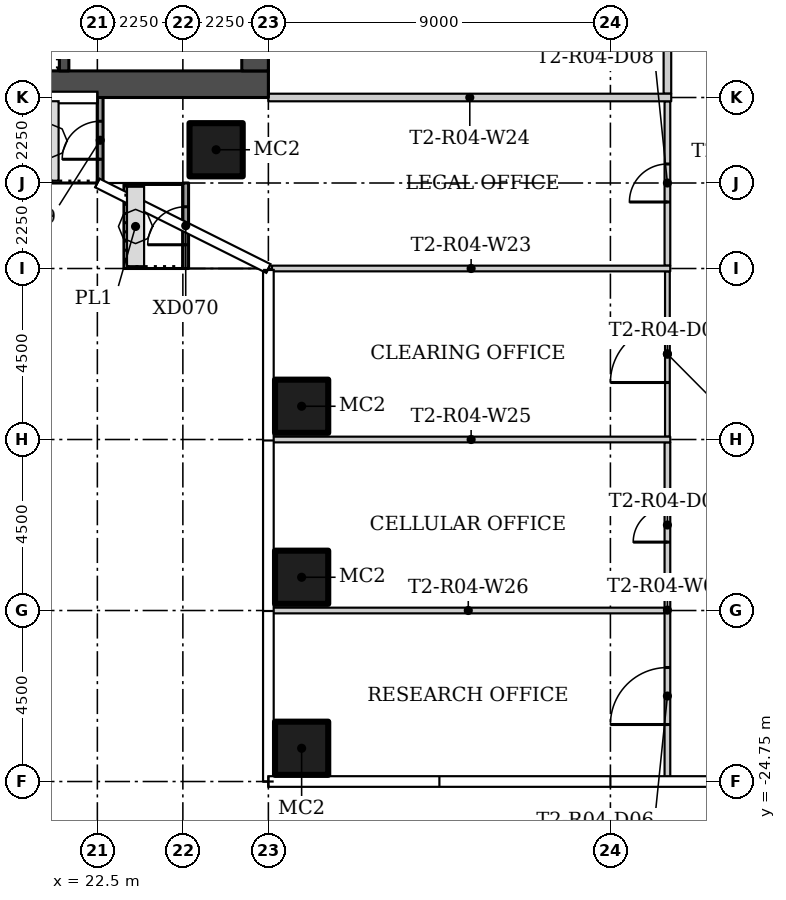
"""IFC4 building model, lengths in metres.
Left out: names, types, materials, properties, quantities, classifications, styles, units other than length and angle.
Written with IfcOpenShell. Run it as: python <this file> out.ifc"""

import sys

from ifc_helpers import new_model, si_unit, direction, frame, frame_2d, origin, origin_2d, place, context, subcontext, project, spatial, rectangle, hollow_rectangle, extrude, element, fill, save


model = new_model("IFC4")
c1 = context("Model", 3, precision=1e-05, world=origin(), true_north=direction((0.0, 1.0)))
c2 = subcontext(c1, "Body", "Model", "MODEL_VIEW")
j1 = project(units=[si_unit("LENGTHUNIT", "METRE"), si_unit("PLANEANGLEUNIT", "RADIAN")], contexts=[c1])
p1 = place(None, origin())
s1 = spatial("IfcSite", under=j1, at=p1, CompositionType="ELEMENT")
p2 = place(p1, origin())
s2 = spatial("IfcBuilding", under=s1, at=p2, CompositionType="ELEMENT")
p3 = place(p2, frame((0.0, 0.0, 53.7)))
s3 = spatial("IfcBuildingStorey", under=s2, at=p3, CompositionType="ELEMENT", Elevation=53.7)
for number, where in (
    (1, (25.625, -8.125, 0.0)),
    (2, (27.875, -14.875, 0.0)),
    (3, (27.875, -19.375, 0.0)),
    (4, (27.875, -23.875, 0.0)),
):
    element("IfcColumn", number, at=place(p3, frame(where)), inside=s3, PredefinedType="COLUMN", context=c2, shape_type="SweptSolid", body=[
        extrude(hollow_rectangle(XDim=1.4, YDim=1.4, WallThickness=0.05, at=origin_2d()), origin(), (0.0, 0.0, 1.0), 3.55),
    ])
p4 = place(p3, frame((37.5, -11.175, 0.0), z_axis=(0.0, 0.0, 1.0), x_axis=(0.0, 1.0, 0.0)))
e5 = element("IfcWall", 5, at=p4, inside=s3, PredefinedType="PARTITIONING", context=c2, shape_type="SweptSolid", body=[
    extrude(rectangle(XDim=4.325, YDim=0.15, at=frame_2d((2.163, 0.0))), origin(), (0.0, 0.0, 1.0), 3.55),
])
p5 = place(p4, frame((1.675, 0.0, 0.0)))
e6 = element("IfcOpeningElement", 6, at=p5, cuts=e5, PredefinedType="OPENING", context=c2, shape_type="SweptSolid", body=[
    extrude(rectangle(XDim=1.0, YDim=2.4, at=frame_2d((0.5, 1.2))), frame((0.0, 0.085, 0.0), z_axis=(0.0, -1.0, 0.0), x_axis=(1.0, 0.0, 0.0)), (0.0, 0.0, 1.0), 0.17),
])
p6 = place(p3, frame((37.5, -24.655, 0.0), z_axis=(0.0, 0.0, 1.0), x_axis=(0.0, 1.0, 0.0)))
e7 = element("IfcWall", 7, at=p6, inside=s3, PredefinedType="PARTITIONING", context=c2, shape_type="SweptSolid", body=[
    extrude(rectangle(XDim=8.83, YDim=0.15, at=frame_2d((4.415, 0.0))), origin(), (0.0, 0.0, 1.0), 3.55),
])
p7 = place(p6, frame((6.205, 0.0, 0.0)))
e8 = element("IfcOpeningElement", 8, at=p7, cuts=e7, PredefinedType="OPENING", context=c2, shape_type="SweptSolid", body=[
    extrude(rectangle(XDim=0.9, YDim=2.1, at=frame_2d((0.45, 1.05))), frame((0.0, 0.085, 0.0), z_axis=(0.0, -1.0, 0.0), x_axis=(1.0, 0.0, 0.0)), (0.0, 0.0, 1.0), 0.17),
])
p8 = place(p6, frame((1.405, 0.0, 0.0)))
e9 = element("IfcOpeningElement", 9, at=p8, cuts=e7, PredefinedType="OPENING", context=c2, shape_type="SweptSolid", body=[
    extrude(rectangle(XDim=1.5, YDim=2.1, at=frame_2d((0.75, 1.05))), frame((0.0, 0.085, 0.0), z_axis=(0.0, -1.0, 0.0), x_axis=(1.0, 0.0, 0.0)), (0.0, 0.0, 1.0), 0.17),
])
p9 = place(p3, frame((37.5, -15.675, 0.0), z_axis=(0.0, 0.0, 1.0), x_axis=(0.0, 1.0, 0.0)))
e10 = element("IfcWall", 10, at=p9, inside=s3, PredefinedType="PARTITIONING", context=c2, shape_type="SweptSolid", body=[
    extrude(rectangle(XDim=4.35, YDim=0.125, at=frame_2d((2.175, 0.0))), origin(), (0.0, 0.0, 1.0), 3.55),
])
p10 = place(p9, frame((1.425, 0.0, 0.0)))
e11 = element("IfcOpeningElement", 11, at=p10, cuts=e10, PredefinedType="OPENING", context=c2, shape_type="SweptSolid", body=[
    extrude(rectangle(XDim=1.5, YDim=2.1, at=frame_2d((0.75, 1.05))), frame((0.0, 0.073, 0.0), z_axis=(0.0, -1.0, 0.0), x_axis=(1.0, 0.0, 0.0)), (0.0, 0.0, 1.0), 0.145),
])
p11 = place(p3, frame((37.5, -6.65, 0.0), z_axis=(0.0, 0.0, 1.0), x_axis=(0.0, 1.0, 0.0)))
e12 = element("IfcWall", 12, at=p11, inside=s3, PredefinedType="PARTITIONING", context=c2, shape_type="SweptSolid", body=[
    extrude(rectangle(XDim=6.6, YDim=0.2, at=frame_2d((3.3, 0.0))), origin(), (0.0, 0.0, 1.0), 3.55),
])
p12 = place(p3, frame((27.095, -11.25, 0.0)))
e13 = element("IfcWall", 13, at=p12, inside=s3, PredefinedType="PARTITIONING", context=c2, shape_type="SweptSolid", body=[
    extrude(rectangle(XDim=10.48, YDim=0.15, at=frame_2d((5.24, 0.0))), origin(), (0.0, 0.0, 1.0), 3.55),
])
p13 = place(p3, frame((37.6, -6.75, 0.0), z_axis=(0.0, 0.0, 1.0), x_axis=(-1.0, 0.0, 0.0)))
e14 = element("IfcWall", 14, at=p13, inside=s3, PredefinedType="PARTITIONING", context=c2, shape_type="SweptSolid", body=[
    extrude(rectangle(XDim=10.6, YDim=0.2, at=frame_2d((5.3, 0.0))), origin(), (0.0, 0.0, 1.0), 3.55),
])
p14 = place(p3, frame((27.095, -15.75, 0.0)))
e15 = element("IfcWall", 15, at=p14, inside=s3, PredefinedType="PARTITIONING", context=c2, shape_type="SweptSolid", body=[
    extrude(rectangle(XDim=10.48, YDim=0.15, at=frame_2d((5.24, 0.0))), origin(), (0.0, 0.0, 1.0), 3.55),
])
p15 = place(p3, frame((27.095, -20.25, 0.0)))
e16 = element("IfcWall", 16, at=p15, inside=s3, PredefinedType="PARTITIONING", context=c2, shape_type="SweptSolid", body=[
    extrude(rectangle(XDim=10.33, YDim=0.15, at=frame_2d((5.165, 0.0))), origin(), (0.0, 0.0, 1.0), 3.55),
])
p16 = place(p3, frame((22.575, -9.0, 0.0), z_axis=(0.0, 0.0, 1.0), x_axis=(0.0, 1.0, 0.0)))
e17 = element("IfcWall", 17, at=p16, inside=s3, PredefinedType="SOLIDWALL", context=c2, shape_type="SweptSolid", body=[
    extrude(rectangle(XDim=2.257, YDim=0.15, at=frame_2d((1.128, 0.0))), origin(), (0.0, 0.0, 1.0), 3.45),
])
p17 = place(p16, frame((0.625, 0.0, 0.0)))
e18 = element("IfcOpeningElement", 18, at=p17, cuts=e17, PredefinedType="OPENING", context=c2, shape_type="SweptSolid", body=[
    extrude(rectangle(XDim=1.0, YDim=2.4, at=frame_2d((0.5, 1.2))), frame((0.0, 0.085, 0.0), z_axis=(0.0, -1.0, 0.0), x_axis=(1.0, 0.0, 0.0)), (0.0, 0.0, 1.0), 0.17),
])
p18 = place(p3, frame((24.825, -11.25, 0.0), z_axis=(0.0, 0.0, 1.0), x_axis=(0.0, 1.0, 0.0)))
e19 = element("IfcWall", 19, at=p18, inside=s3, PredefinedType="SOLIDWALL", context=c2, shape_type="SweptSolid", body=[
    extrude(rectangle(XDim=2.25, YDim=0.15, at=frame_2d((1.125, 0.0))), origin(), (0.0, 0.0, 1.0), 3.45),
])
p19 = place(p18, frame((0.625, 0.0, 0.0)))
e20 = element("IfcOpeningElement", 20, at=p19, cuts=e19, PredefinedType="OPENING", context=c2, shape_type="SweptSolid", body=[
    extrude(rectangle(XDim=1.0, YDim=2.4, at=frame_2d((0.5, 1.2))), frame((0.0, 0.085, 0.0), z_axis=(0.0, -1.0, 0.0), x_axis=(1.0, 0.0, 0.0)), (0.0, 0.0, 1.0), 0.17),
])
p20 = place(p3, frame((13.5, -6.4, 0.0)))
e21 = element("IfcWall", 21, at=p20, inside=s3, PredefinedType="SHEAR", context=c2, shape_type="SweptSolid", body=[
    extrude(rectangle(XDim=13.5, YDim=0.7, at=frame_2d((6.75, 0.0))), origin(), (0.0, 0.0, 1.0), 3.55),
])
p21 = place(p3, frame((26.65, 6.05, 0.0), z_axis=(0.0, 0.0, 1.0), x_axis=(0.0, -1.0, 0.0)))
e22 = element("IfcWall", 22, at=p21, inside=s3, PredefinedType="SHEAR", context=c2, shape_type="SweptSolid", body=[
    extrude(rectangle(XDim=12.1, YDim=0.7, at=frame_2d((6.05, 0.0))), origin(), (0.0, 0.0, 1.0), 3.55),
])
p22 = place(p21, frame((10.1, 0.0, 0.0)))
e23 = element("IfcOpeningElement", 23, at=p22, cuts=e22, PredefinedType="OPENING", context=c2, shape_type="SweptSolid", body=[
    extrude(rectangle(XDim=1.2, YDim=2.1, at=frame_2d((0.6, 1.05))), frame((0.0, 0.36, 0.0), z_axis=(0.0, -1.0, 0.0), x_axis=(1.0, 0.0, 0.0)), (0.0, 0.0, 1.0), 0.72),
])
p23 = place(p21, frame((3.9, 0.0, 0.0)))
e24 = element("IfcOpeningElement", 24, at=p23, cuts=e22, PredefinedType="OPENING", context=c2, shape_type="SweptSolid", body=[
    extrude(rectangle(XDim=1.8, YDim=2.4, at=frame_2d((0.9, 1.2))), frame((0.0, 0.36, 0.0), z_axis=(0.0, -1.0, 0.0), x_axis=(1.0, 0.0, 0.0)), (0.0, 0.0, 1.0), 0.72),
])
p24 = place(p3, frame((21.625, -6.05, 0.0), z_axis=(0.0, 0.0, 1.0), x_axis=(0.0, 1.0, 0.0)))
e25 = element("IfcWall", 25, at=p24, inside=s3, PredefinedType="SHEAR", context=c2, shape_type="SweptSolid", body=[
    extrude(rectangle(XDim=2.55, YDim=0.25, at=frame_2d((1.275, 0.0))), origin(), (0.0, 0.0, 1.0), 3.55),
])
p25 = place(p7, origin())
e26 = element("IfcDoor", 26, at=p25, inside=s3, OperationType="SINGLE_SWING_LEFT", PredefinedType="DOOR", context=c2, shape_type="SweptSolid", body=[
    extrude(rectangle(XDim=0.9, YDim=2.1, at=frame_2d((0.45, 1.05))), frame((0.0, 0.025, 0.0), z_axis=(0.0, -1.0, 0.0), x_axis=(1.0, 0.0, 0.0)), (0.0, 0.0, 1.0), 0.05),
])
fill(e8, e26)
p26 = place(p8, origin())
e27 = element("IfcDoor", 27, at=p26, inside=s3, OperationType="DOUBLE_DOOR_SINGLE_SWING", PredefinedType="DOOR", context=c2, shape_type="SweptSolid", body=[
    extrude(rectangle(XDim=1.5, YDim=2.1, at=frame_2d((0.75, 1.05))), frame((0.0, 0.025, 0.0), z_axis=(0.0, -1.0, 0.0), x_axis=(1.0, 0.0, 0.0)), (0.0, 0.0, 1.0), 0.05),
])
fill(e9, e27)
p27 = place(p10, origin())
e28 = element("IfcDoor", 28, at=p27, inside=s3, OperationType="DOUBLE_DOOR_SINGLE_SWING", PredefinedType="DOOR", context=c2, shape_type="SweptSolid", body=[
    extrude(rectangle(XDim=1.5, YDim=2.1, at=frame_2d((0.75, 1.05))), frame((0.0, 0.025, 0.0), z_axis=(0.0, -1.0, 0.0), x_axis=(1.0, 0.0, 0.0)), (0.0, 0.0, 1.0), 0.05),
])
fill(e11, e28)
p28 = place(p5, origin())
e29 = element("IfcDoor", 29, at=p28, inside=s3, OperationType="SINGLE_SWING_RIGHT", PredefinedType="DOOR", context=c2, shape_type="SweptSolid", body=[
    extrude(rectangle(XDim=1.0, YDim=2.4, at=frame_2d((0.5, 1.2))), frame((0.0, 0.025, 0.0), z_axis=(0.0, -1.0, 0.0), x_axis=(1.0, 0.0, 0.0)), (0.0, 0.0, 1.0), 0.05),
])
fill(e6, e29)
p29 = place(p17, origin())
e30 = element("IfcDoor", 30, at=p29, inside=s3, OperationType="SINGLE_SWING_LEFT", PredefinedType="DOOR", context=c2, shape_type="SweptSolid", body=[
    extrude(rectangle(XDim=1.0, YDim=2.4, at=frame_2d((0.5, 1.2))), frame((0.0, 0.025, 0.0), z_axis=(0.0, -1.0, 0.0), x_axis=(1.0, 0.0, 0.0)), (0.0, 0.0, 1.0), 0.05),
])
fill(e18, e30)
p30 = place(p19, origin())
e31 = element("IfcDoor", 31, at=p30, inside=s3, OperationType="SINGLE_SWING_RIGHT", PredefinedType="DOOR", context=c2, shape_type="SweptSolid", body=[
    extrude(rectangle(XDim=1.0, YDim=2.4, at=frame_2d((0.5, 1.2))), frame((0.0, 0.025, 0.0), z_axis=(0.0, -1.0, 0.0), x_axis=(1.0, 0.0, 0.0)), (0.0, 0.0, 1.0), 0.05),
])
fill(e20, e31)
save(model, sys.argv[1])
